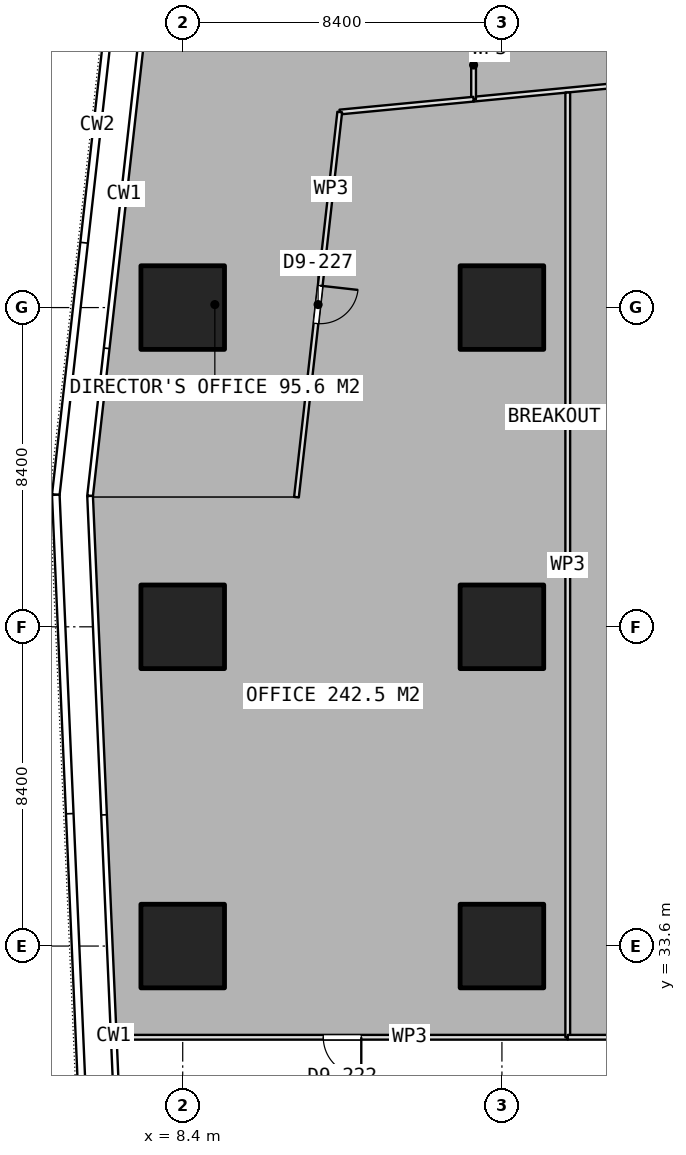
"""IFC4 building model, lengths in metres.
Left out: names, types, materials, properties, quantities, classifications, styles, units other than length and angle.
Written with IfcOpenShell. Run it as: python <this file> out.ifc"""

import sys

from ifc_helpers import new_model, si_unit, direction, frame, frame_2d, origin, origin_2d, place, context, subcontext, project, spatial, rectangle, extrude, element, fill, save


model = new_model("IFC4")
c1 = context("Model", 3, precision=1e-05, world=origin(), true_north=direction((0.0, 1.0)))
c2 = subcontext(c1, "Body", "Model", "MODEL_VIEW")
j1 = project(units=[si_unit("LENGTHUNIT", "METRE"), si_unit("PLANEANGLEUNIT", "RADIAN")], contexts=[c1])
p1 = place(None, origin())
s1 = spatial("IfcSite", under=j1, at=p1, CompositionType="ELEMENT")
p2 = place(p1, origin())
s2 = spatial("IfcBuilding", under=s1, at=p2, CompositionType="ELEMENT")
p3 = place(p2, frame((0.0, 0.0, 66.65)))
s3 = spatial("IfcBuildingStorey", under=s2, at=p3, CompositionType="ELEMENT", Elevation=66.65)
for number, where, z_axis, x_axis in (
    (1, (8.4, 33.6, 0.0), (0.0, 0.0, 1.0), (1.0, 0.0, 0.0)),
    (2, (8.4, 42.0, 0.0), (0.0, 0.0, 1.0), (1.0, 0.0, 0.0)),
    (3, (8.4, 50.4, 0.0), (0.0, 0.0, 1.0), (1.0, 0.0, 0.0)),
    (4, (16.8, 33.6, 0.0), (0.0, 0.0, 1.0), (1.0, 0.0, 0.0)),
    (5, (16.8, 42.0, 0.0), (0.0, 0.0, 1.0), (1.0, 0.0, 0.0)),
    (6, (16.8, 50.4, 0.0), (0.0, 0.0, 1.0), (1.0, 0.0, 0.0)),
):
    element("IfcColumn", number, at=place(p3, frame(where, z_axis=z_axis, x_axis=x_axis)), inside=s3, PredefinedType="COLUMN", context=c2, shape_type="SweptSolid", body=[
        extrude(rectangle(XDim=2.2, YDim=2.2, at=origin_2d()), origin(), (0.0, 0.0, 1.0), 3.75),
    ])
p4 = place(p3, frame((25.287, 56.772, 0.0), z_axis=(0.0, 0.0, 1.0), x_axis=(-0.995407630517, -0.095726950797, 0.0)))
e7 = element("IfcWall", 7, at=p4, inside=s3, PredefinedType="PARTITIONING", context=c2, shape_type="SweptSolid", body=[
    extrude(rectangle(XDim=9.276, YDim=0.125, at=frame_2d((4.638, 0.0))), origin(), (0.0, 0.0, 1.0), 3.5),
])
p5 = place(p3, frame((16.054, 55.884, 0.0), z_axis=(0.0, 0.0, 1.0), x_axis=(0.0, 1.0, 0.0)))
e8 = element("IfcWall", 8, at=p5, inside=s3, PredefinedType="PARTITIONING", context=c2, shape_type="SweptSolid", body=[
    extrude(rectangle(XDim=1.796, YDim=0.125, at=frame_2d((0.898, 0.0))), origin(), (0.0, 0.0, 1.0), 3.5),
])
p6 = place(p3, frame((16.053, 55.883, 0.0), z_axis=(0.0, 0.0, 1.0), x_axis=(-0.995420403314, -0.095594040951, 0.0)))
e9 = element("IfcWall", 9, at=p6, inside=s3, PredefinedType="PARTITIONING", context=c2, shape_type="SweptSolid", body=[
    extrude(rectangle(XDim=3.537, YDim=0.125, at=frame_2d((1.769, 0.0))), origin(), (0.0, 0.0, 1.0), 3.5),
])
p7 = place(p3, frame((12.532, 55.545, 0.0), z_axis=(0.0, 0.0, 1.0), x_axis=(-0.111695467503, -0.99374248301, 0.0)))
e10 = element("IfcWall", 10, at=p7, inside=s3, PredefinedType="PARTITIONING", context=c2, shape_type="SweptSolid", body=[
    extrude(rectangle(XDim=10.197, YDim=0.125, at=frame_2d((5.098, 0.0))), origin(), (0.0, 0.0, 1.0), 3.5),
])
p8 = place(p7, frame((4.598, 0.0, 0.0)))
e11 = element("IfcOpeningElement", 11, at=p8, cuts=e10, PredefinedType="OPENING", context=c2, shape_type="SweptSolid", body=[
    extrude(rectangle(XDim=1.0, YDim=2.1, at=frame_2d((0.5, 1.05))), frame((0.0, 0.073, 0.0), z_axis=(0.0, -1.0, 0.0), x_axis=(1.0, 0.0, 0.0)), (0.0, 0.0, 1.0), 0.145),
])
p9 = place(p3, frame((18.532, 31.2, 0.0), z_axis=(0.0, 0.0, 1.0), x_axis=(-1.0, 0.0, 0.0)))
e12 = element("IfcWall", 12, at=p9, inside=s3, PredefinedType="PARTITIONING", context=c2, shape_type="SweptSolid", body=[
    extrude(rectangle(XDim=11.897, YDim=0.125, at=frame_2d((5.948, 0.0))), origin(), (0.0, 0.0, 1.0), 3.5),
])
p10 = place(p9, frame((5.433, 0.0, 0.0)))
e13 = element("IfcOpeningElement", 13, at=p10, cuts=e12, PredefinedType="OPENING", context=c2, shape_type="SweptSolid", body=[
    extrude(rectangle(XDim=1.0, YDim=2.1, at=frame_2d((0.5, 1.05))), frame((0.0, 0.073, 0.0), z_axis=(0.0, -1.0, 0.0), x_axis=(1.0, 0.0, 0.0)), (0.0, 0.0, 1.0), 0.145),
])
p11 = place(p3, frame((18.532, 56.059, 0.0), z_axis=(0.0, 0.0, 1.0), x_axis=(0.0, -1.0, 0.0)))
e14 = element("IfcWall", 14, at=p11, inside=s3, PredefinedType="PARTITIONING", context=c2, shape_type="SweptSolid", body=[
    extrude(rectangle(XDim=24.859, YDim=0.125, at=frame_2d((12.43, 0.0))), origin(), (0.0, 0.0, 1.0), 3.5),
])
p12 = place(p3, frame((22.4, 31.2, 0.0), z_axis=(0.0, 0.0, 1.0), x_axis=(-1.0, 0.0, 0.0)))
e15 = element("IfcWall", 15, at=p12, inside=s3, PredefinedType="PARTITIONING", context=c2, shape_type="SweptSolid", body=[
    extrude(rectangle(XDim=3.868, YDim=0.125, at=frame_2d((1.934, 0.0))), origin(), (0.0, 0.0, 1.0), 3.5),
])
p13 = place(p10, origin())
e16 = element("IfcDoor", 16, at=p13, inside=s3, OperationType="SINGLE_SWING_LEFT", PredefinedType="DOOR", context=c2, shape_type="SweptSolid", body=[
    extrude(rectangle(XDim=1.0, YDim=2.1, at=frame_2d((0.5, 1.05))), frame((0.0, 0.025, 0.0), z_axis=(0.0, -1.0, 0.0), x_axis=(1.0, 0.0, 0.0)), (0.0, 0.0, 1.0), 0.05),
])
fill(e13, e16)
p14 = place(p8, origin())
e17 = element("IfcDoor", 17, at=p14, inside=s3, OperationType="SINGLE_SWING_LEFT", PredefinedType="DOOR", context=c2, shape_type="SweptSolid", body=[
    extrude(rectangle(XDim=1.0, YDim=2.1, at=frame_2d((0.5, 1.05))), frame((0.0, 0.025, 0.0), z_axis=(0.0, -1.0, 0.0), x_axis=(1.0, 0.0, 0.0)), (0.0, 0.0, 1.0), 0.05),
])
fill(e11, e17)
save(model, sys.argv[1])
